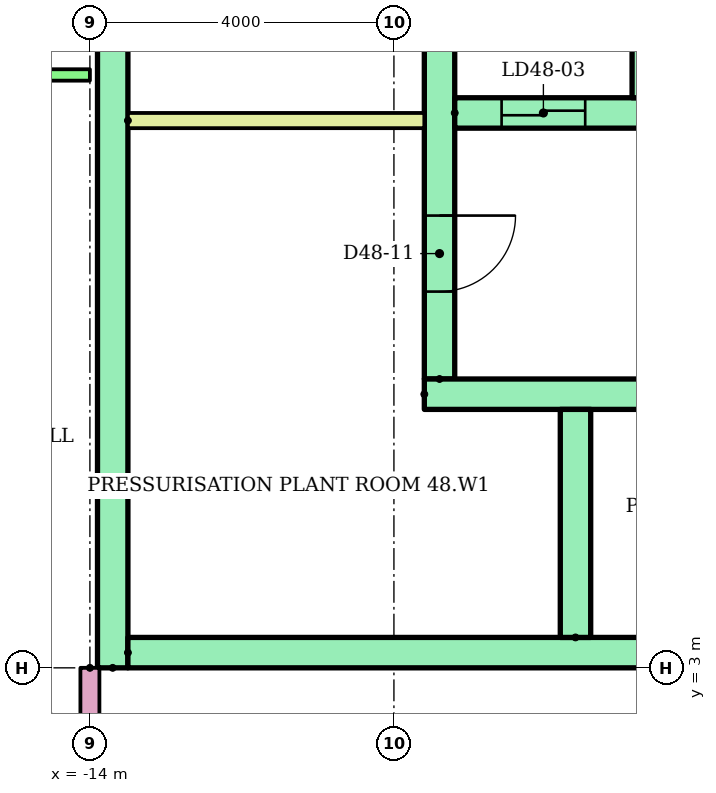
"""IFC4 building model, lengths in metres.
Left out: names, types, materials, properties, quantities, classifications, styles, units other than length and angle.
Written with IfcOpenShell. Run it as: python <this file> out.ifc"""

import sys

from ifc_helpers import new_model, si_unit, direction, frame, frame_2d, origin, place, context, subcontext, project, spatial, rectangle, extrude, element, fill, save


model = new_model("IFC4")
c1 = context("Model", 3, precision=1e-05, world=origin(), true_north=direction((0.0, 1.0)))
c2 = subcontext(c1, "Body", "Model", "MODEL_VIEW")
j1 = project(units=[si_unit("LENGTHUNIT", "METRE"), si_unit("PLANEANGLEUNIT", "RADIAN")], contexts=[c1])
p1 = place(None, origin())
s1 = spatial("IfcSite", under=j1, at=p1, CompositionType="ELEMENT")
p2 = place(p1, origin())
s2 = spatial("IfcBuilding", under=s1, at=p2, CompositionType="ELEMENT")
p3 = place(p2, frame((0.0, 0.0, 184.5)))
s3 = spatial("IfcBuildingStorey", under=s2, at=p3, CompositionType="ELEMENT", Elevation=184.5)
p4 = place(p3, frame((-13.7, 3.0, 0.0), z_axis=(0.0, 0.0, 1.0), x_axis=(0.0, 1.0, 0.0)))
e1 = element("IfcWall", 1, at=p4, inside=s3, PredefinedType="SHEAR", context=c2, shape_type="SweptSolid", body=[
    extrude(rectangle(XDim=17.0, YDim=0.4, at=frame_2d((8.5, 0.0))), origin(), (0.0, 0.0, 1.0), 2.92),
])
p5 = place(p3, frame((-9.4, 6.8, 0.0), z_axis=(0.0, 0.0, 1.0), x_axis=(0.0, 1.0, 0.0)))
e2 = element("IfcWall", 2, at=p5, inside=s3, PredefinedType="SHEAR", context=c2, shape_type="SweptSolid", body=[
    extrude(rectangle(XDim=12.7, YDim=0.4, at=frame_2d((6.35, 0.0))), origin(), (0.0, 0.0, 1.0), 2.92),
])
p6 = place(p5, frame((1.15, 0.0, 0.0)))
e3 = element("IfcOpeningElement", 3, at=p6, cuts=e2, PredefinedType="OPENING", context=c2, shape_type="SweptSolid", body=[
    extrude(rectangle(XDim=1.0, YDim=2.1, at=frame_2d((0.5, 1.05))), frame((0.0, 0.21, 0.0), z_axis=(0.0, -1.0, 0.0), x_axis=(1.0, 0.0, 0.0)), (0.0, 0.0, 1.0), 0.42),
])
p7 = place(p5, frame((7.925, 0.0, 0.0)))
e4 = element("IfcOpeningElement", 4, at=p7, cuts=e2, PredefinedType="OPENING", context=c2, shape_type="SweptSolid", body=[
    extrude(rectangle(XDim=1.0, YDim=2.1, at=frame_2d((0.5, 1.05))), frame((0.0, 0.21, 0.0), z_axis=(0.0, -1.0, 0.0), x_axis=(1.0, 0.0, 0.0)), (0.0, 0.0, 1.0), 0.42),
])
p8 = place(p3, frame((-13.5, 3.2, 0.0)))
e5 = element("IfcWall", 5, at=p8, inside=s3, PredefinedType="SHEAR", context=c2, shape_type="SweptSolid", body=[
    extrude(rectangle(XDim=27.0, YDim=0.4, at=frame_2d((13.5, 0.0))), origin(), (0.0, 0.0, 1.0), 2.92),
])
p9 = place(p8, frame((22.083, 0.0, 0.0)))
e6 = element("IfcOpeningElement", 6, at=p9, cuts=e5, PredefinedType="OPENING", context=c2, shape_type="SweptSolid", body=[
    extrude(rectangle(XDim=1.1, YDim=2.1, at=frame_2d((0.55, 1.05))), frame((0.0, 0.21, 0.0), z_axis=(0.0, -1.0, 0.0), x_axis=(1.0, 0.0, 0.0)), (0.0, 0.0, 1.0), 0.42),
])
p10 = place(p8, frame((25.128, 0.0, 0.0)))
e7 = element("IfcOpeningElement", 7, at=p10, cuts=e5, PredefinedType="OPENING", context=c2, shape_type="SweptSolid", body=[
    extrude(rectangle(XDim=1.1, YDim=2.1, at=frame_2d((0.55, 1.05))), frame((0.0, 0.21, 0.0), z_axis=(0.0, -1.0, 0.0), x_axis=(1.0, 0.0, 0.0)), (0.0, 0.0, 1.0), 0.42),
])
p11 = place(p8, frame((12.6, 0.0, 0.0)))
e8 = element("IfcOpeningElement", 8, at=p11, cuts=e5, PredefinedType="OPENING", context=c2, shape_type="SweptSolid", body=[
    extrude(rectangle(XDim=1.8, YDim=2.1, at=frame_2d((0.9, 1.05))), frame((0.0, 0.21, 0.0), z_axis=(0.0, -1.0, 0.0), x_axis=(1.0, 0.0, 0.0)), (0.0, 0.0, 1.0), 0.42),
])
p12 = place(p3, frame((-9.6, 6.6, 0.0)))
e9 = element("IfcWall", 9, at=p12, inside=s3, PredefinedType="SHEAR", context=c2, shape_type="SweptSolid", body=[
    extrude(rectangle(XDim=8.078, YDim=0.4, at=frame_2d((4.039, 0.0))), origin(), (0.0, 0.0, 1.0), 2.92),
])
p13 = place(p12, frame((4.533, 0.0, 0.0)))
e10 = element("IfcOpeningElement", 10, at=p13, cuts=e9, PredefinedType="OPENING", context=c2, shape_type="SweptSolid", body=[
    extrude(rectangle(XDim=1.0, YDim=2.1, at=frame_2d((0.5, 1.05))), frame((0.0, 0.21, 0.0), z_axis=(0.0, -1.0, 0.0), x_axis=(1.0, 0.0, 0.0)), (0.0, 0.0, 1.0), 0.42),
])
p14 = place(p3, frame((-7.611, 3.4, 0.0), z_axis=(0.0, 0.0, 1.0), x_axis=(0.0, 1.0, 0.0)))
e11 = element("IfcWall", 11, at=p14, inside=s3, PredefinedType="SHEAR", context=c2, shape_type="SweptSolid", body=[
    extrude(rectangle(XDim=3.0, YDim=0.4, at=frame_2d((1.5, 0.0))), origin(), (0.0, 0.0, 1.0), 2.92),
])
p15 = place(p3, frame((-9.2, 10.3, 0.0)))
e12 = element("IfcWall", 12, at=p15, inside=s3, PredefinedType="SHEAR", context=c2, shape_type="SweptSolid", body=[
    extrude(rectangle(XDim=8.0, YDim=0.4, at=frame_2d((4.0, 0.0))), origin(), (0.0, 0.0, 1.0), 2.92),
])
p16 = place(p15, frame((0.617, 0.0, 0.0)))
e13 = element("IfcOpeningElement", 13, at=p16, cuts=e12, PredefinedType="OPENING", context=c2, shape_type="SweptSolid", body=[
    extrude(rectangle(XDim=1.1, YDim=2.1, at=frame_2d((0.55, 1.05))), frame((0.0, 0.21, 0.0), z_axis=(0.0, -1.0, 0.0), x_axis=(1.0, 0.0, 0.0)), (0.0, 0.0, 1.0), 0.42),
])
p17 = place(p15, frame((3.4, 0.0, 0.0)))
e14 = element("IfcOpeningElement", 14, at=p17, cuts=e12, PredefinedType="OPENING", context=c2, shape_type="SweptSolid", body=[
    extrude(rectangle(XDim=1.0, YDim=2.1, at=frame_2d((0.5, 1.05))), frame((0.0, 0.21, 0.0), z_axis=(0.0, -1.0, 0.0), x_axis=(1.0, 0.0, 0.0)), (0.0, 0.0, 1.0), 0.42),
])
p18 = place(p15, frame((6.133, 0.0, 0.0)))
e15 = element("IfcOpeningElement", 15, at=p18, cuts=e12, PredefinedType="OPENING", context=c2, shape_type="SweptSolid", body=[
    extrude(rectangle(XDim=1.0, YDim=2.1, at=frame_2d((0.5, 1.05))), frame((0.0, 0.21, 0.0), z_axis=(0.0, -1.0, 0.0), x_axis=(1.0, 0.0, 0.0)), (0.0, 0.0, 1.0), 0.42),
])
p19 = place(p3, frame((-6.667, 10.5, 0.0), z_axis=(0.0, 0.0, 1.0), x_axis=(0.0, 1.0, 0.0)))
e16 = element("IfcWall", 16, at=p19, inside=s3, PredefinedType="SHEAR", context=c2, shape_type="SweptSolid", body=[
    extrude(rectangle(XDim=3.0, YDim=0.4, at=frame_2d((1.5, 0.0))), origin(), (0.0, 0.0, 1.0), 2.92),
])
p20 = place(p3, frame((-13.5, 10.2, 0.0)))
e17 = element("IfcWall", 17, at=p20, inside=s3, PredefinedType="PARTITIONING", context=c2, shape_type="SweptSolid", body=[
    extrude(rectangle(XDim=3.9, YDim=0.2, at=frame_2d((1.95, 0.0))), origin(), (0.0, 0.0, 1.0), 2.92),
])
p21 = place(p3, frame((-24.82, 10.8, 0.0)))
e18 = element("IfcWall", 18, at=p21, inside=s3, PredefinedType="PARTITIONING", context=c2, shape_type="SweptSolid", body=[
    extrude(rectangle(XDim=10.82, YDim=0.15, at=frame_2d((5.41, 0.0))), origin(), (0.0, 0.0, 1.0), 2.4),
])
p22 = place(p21, frame((1.273, 0.0, 0.0)))
e19 = element("IfcOpeningElement", 19, at=p22, cuts=e18, PredefinedType="OPENING", context=c2, shape_type="SweptSolid", body=[
    extrude(rectangle(XDim=1.0, YDim=2.1, at=frame_2d((0.5, 1.05))), frame((0.0, 0.085, 0.0), z_axis=(0.0, -1.0, 0.0), x_axis=(1.0, 0.0, 0.0)), (0.0, 0.0, 1.0), 0.17),
])
p23 = place(p21, frame((7.32, 0.0, 0.0)))
e20 = element("IfcOpeningElement", 20, at=p23, cuts=e18, PredefinedType="OPENING", context=c2, shape_type="SweptSolid", body=[
    extrude(rectangle(XDim=0.9, YDim=2.1, at=frame_2d((0.45, 1.05))), frame((0.0, 0.085, 0.0), z_axis=(0.0, -1.0, 0.0), x_axis=(1.0, 0.0, 0.0)), (0.0, 0.0, 1.0), 0.17),
])
p24 = place(p3, frame((-14.0, 3.0, 0.0), z_axis=(0.0, 0.0, 1.0), x_axis=(0.0, -1.0, 0.0)))
e21 = element("IfcWall", 21, at=p24, inside=s3, PredefinedType="PARTITIONING", context=c2, shape_type="SweptSolid", body=[
    extrude(rectangle(XDim=1.6, YDim=0.25, at=frame_2d((0.8, 0.0))), origin(), (0.0, 0.0, 1.0), 2.4),
])
p25 = place(p16, origin())
e22 = element("IfcDoor", 22, at=p25, inside=s3, OperationType="SLIDING_TO_LEFT", PredefinedType="DOOR", context=c2, shape_type="SweptSolid", body=[
    extrude(rectangle(XDim=1.1, YDim=2.1, at=frame_2d((0.55, 1.05))), frame((0.0, 0.025, 0.0), z_axis=(0.0, -1.0, 0.0), x_axis=(1.0, 0.0, 0.0)), (0.0, 0.0, 1.0), 0.05),
])
fill(e13, e22)
p26 = place(p6, frame((1.0, 0.0, 0.0), z_axis=(0.0, 0.0, 1.0), x_axis=(-1.0, 0.0, 0.0)))
e23 = element("IfcDoor", 23, at=p26, inside=s3, OperationType="SINGLE_SWING_RIGHT", PredefinedType="DOOR", context=c2, shape_type="SweptSolid", body=[
    extrude(rectangle(XDim=1.0, YDim=2.1, at=frame_2d((0.5, 1.05))), frame((0.0, 0.025, 0.0), z_axis=(0.0, -1.0, 0.0), x_axis=(1.0, 0.0, 0.0)), (0.0, 0.0, 1.0), 0.05),
])
fill(e3, e23)
save(model, sys.argv[1])
